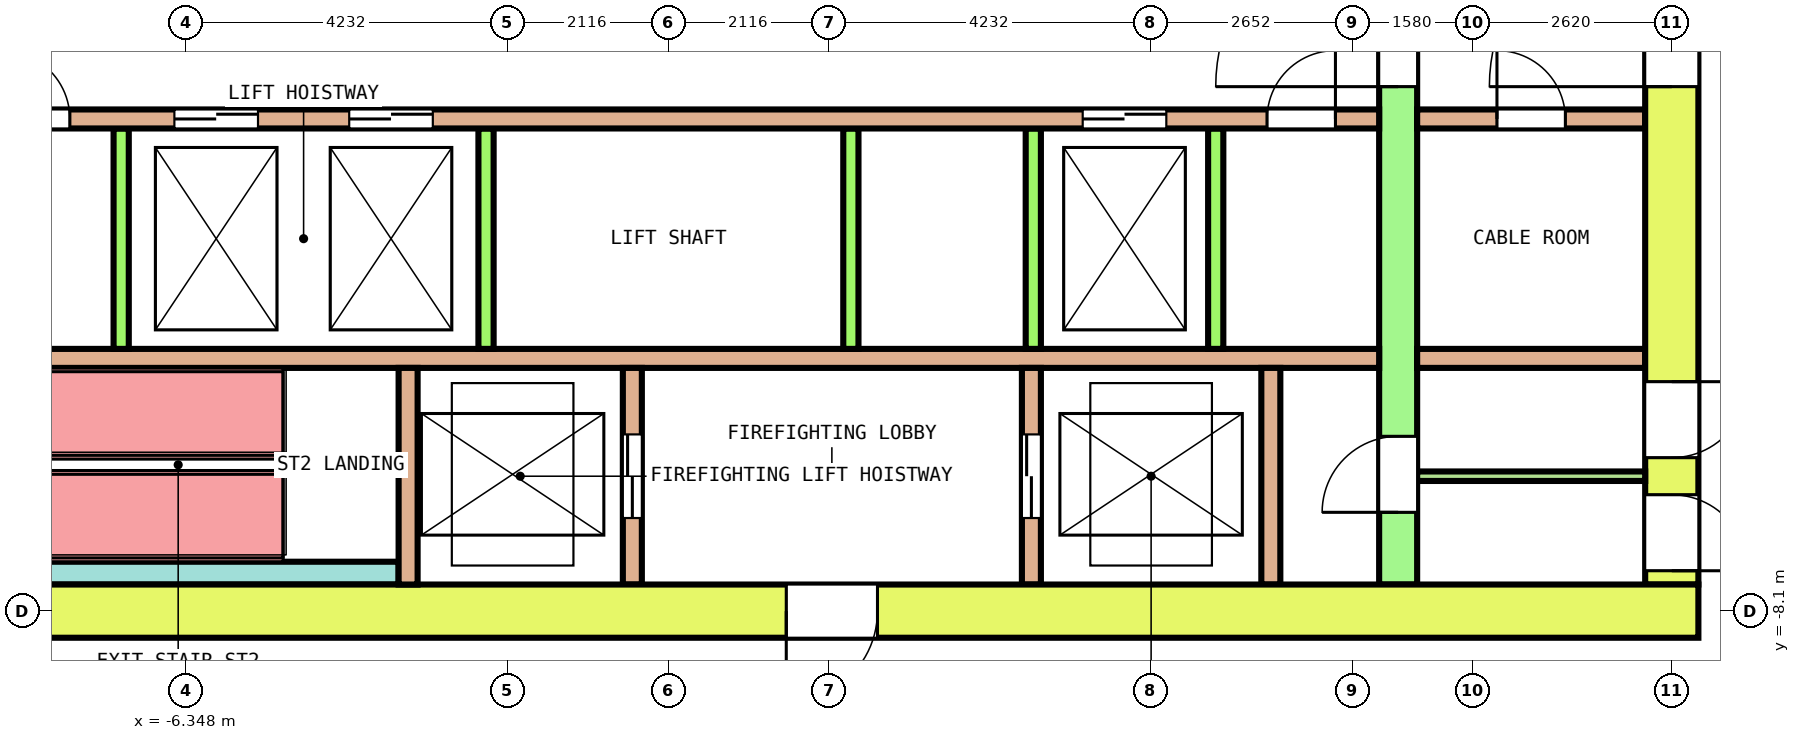
"""IFC4 building model, lengths in metres.
Left out: names, types, materials, properties, quantities, classifications, styles, units other than length and angle.
Written with IfcOpenShell. Run it as: python <this file> out.ifc"""

import sys

from ifc_helpers import new_model, si_unit, direction, frame, frame_2d, origin, place, context, subcontext, project, spatial, rectangle, extrude, element, fill, save


model = new_model("IFC4")
c1 = context("Model", 3, precision=1e-05, world=origin(), true_north=direction((0.0, 1.0)))
c2 = subcontext(c1, "Body", "Model", "MODEL_VIEW")
j1 = project(units=[si_unit("LENGTHUNIT", "METRE"), si_unit("PLANEANGLEUNIT", "RADIAN")], contexts=[c1])
p1 = place(None, origin())
s1 = spatial("IfcSite", under=j1, at=p1, CompositionType="ELEMENT")
p2 = place(p1, origin())
s2 = spatial("IfcBuilding", under=s1, at=p2, CompositionType="ELEMENT")
p3 = place(p2, frame((0.0, 0.0, 189.2)))
s3 = spatial("IfcBuildingStorey", under=s2, at=p3, CompositionType="ELEMENT", Elevation=189.2)
p4 = place(p3, frame((-13.55, -8.1, 0.0), z_axis=(0.0, 0.0, 1.0), x_axis=(1.0, 0.0, 0.0)))
e1 = element("IfcWall", 1, at=p4, inside=s3, PredefinedType="SHEAR", context=c2, shape_type="SweptSolid", body=[
    extrude(rectangle(XDim=27.1, YDim=0.7, at=frame_2d((13.55, 0.0))), origin(), (0.0, 0.0, 1.0), 4.1),
])
p5 = place(p4, frame((15.1, 0.0, 0.0)))
e2 = element("IfcOpeningElement", 2, at=p5, cuts=e1, PredefinedType="OPENING", context=c2, shape_type="SweptSolid", body=[
    extrude(rectangle(XDim=1.2, YDim=2.1, at=frame_2d((0.6, 1.05))), frame((0.0, 0.36, 0.0), z_axis=(0.0, -1.0, 0.0), x_axis=(1.0, 0.0, 0.0)), (0.0, 0.0, 1.0), 0.72),
])
p6 = place(p3, frame((13.2, -7.75, 0.0), z_axis=(0.0, 0.0, 1.0), x_axis=(0.0, 1.0, 0.0)))
e3 = element("IfcWall", 3, at=p6, inside=s3, PredefinedType="SHEAR", context=c2, shape_type="SweptSolid", body=[
    extrude(rectangle(XDim=15.5, YDim=0.7, at=frame_2d((7.75, 0.0))), origin(), (0.0, 0.0, 1.0), 4.1),
])
p7 = place(p6, frame((6.55, 0.0, 0.0)))
e4 = element("IfcOpeningElement", 4, at=p7, cuts=e3, PredefinedType="OPENING", context=c2, shape_type="SweptSolid", body=[
    extrude(rectangle(XDim=2.4, YDim=2.1, at=frame_2d((1.2, 1.05))), frame((0.0, 0.36, 0.0), z_axis=(0.0, -1.0, 0.0), x_axis=(1.0, 0.0, 0.0)), (0.0, 0.0, 1.0), 0.72),
])
p8 = place(p6, frame((13.45, 0.0, 0.0)))
e5 = element("IfcOpeningElement", 5, at=p8, cuts=e3, PredefinedType="OPENING", context=c2, shape_type="SweptSolid", body=[
    extrude(rectangle(XDim=1.2, YDim=2.1, at=frame_2d((0.6, 1.05))), frame((0.0, 0.36, 0.0), z_axis=(0.0, -1.0, 0.0), x_axis=(1.0, 0.0, 0.0)), (0.0, 0.0, 1.0), 0.72),
])
p9 = place(p6, frame((0.181, 0.0, 0.0)))
e6 = element("IfcOpeningElement", 6, at=p9, cuts=e3, PredefinedType="OPENING", context=c2, shape_type="SweptSolid", body=[
    extrude(rectangle(XDim=1.0, YDim=2.1, at=frame_2d((0.5, 1.05))), frame((0.0, 0.36, 0.0), z_axis=(0.0, -1.0, 0.0), x_axis=(1.0, 0.0, 0.0)), (0.0, 0.0, 1.0), 0.72),
])
p10 = place(p6, frame((1.669, 0.0, 0.0)))
e7 = element("IfcOpeningElement", 7, at=p10, cuts=e3, PredefinedType="OPENING", context=c2, shape_type="SweptSolid", body=[
    extrude(rectangle(XDim=1.0, YDim=2.1, at=frame_2d((0.5, 1.05))), frame((0.0, 0.36, 0.0), z_axis=(0.0, -1.0, 0.0), x_axis=(1.0, 0.0, 0.0)), (0.0, 0.0, 1.0), 0.72),
])
p11 = place(p3, frame((9.6, -7.75, 0.0), z_axis=(0.0, 0.0, 1.0), x_axis=(0.0, 1.0, 0.0)))
e8 = element("IfcWall", 8, at=p11, inside=s3, PredefinedType="SHEAR", context=c2, shape_type="SweptSolid", body=[
    extrude(rectangle(XDim=15.5, YDim=0.5, at=frame_2d((7.75, 0.0))), origin(), (0.0, 0.0, 1.0), 4.1),
])
p12 = place(p11, frame((6.55, 0.0, 0.0)))
e9 = element("IfcOpeningElement", 9, at=p12, cuts=e8, PredefinedType="OPENING", context=c2, shape_type="SweptSolid", body=[
    extrude(rectangle(XDim=2.4, YDim=2.1, at=frame_2d((1.2, 1.05))), frame((0.0, 0.26, 0.0), z_axis=(0.0, -1.0, 0.0), x_axis=(1.0, 0.0, 0.0)), (0.0, 0.0, 1.0), 0.52),
])
p13 = place(p11, frame((13.45, 0.0, 0.0)))
e10 = element("IfcOpeningElement", 10, at=p13, cuts=e8, PredefinedType="OPENING", context=c2, shape_type="SweptSolid", body=[
    extrude(rectangle(XDim=1.2, YDim=2.1, at=frame_2d((0.6, 1.05))), frame((0.0, 0.26, 0.0), z_axis=(0.0, -1.0, 0.0), x_axis=(1.0, 0.0, 0.0)), (0.0, 0.0, 1.0), 0.52),
])
p14 = place(p11, frame((0.95, 0.0, 0.0)))
e11 = element("IfcOpeningElement", 11, at=p14, cuts=e8, PredefinedType="OPENING", context=c2, shape_type="SweptSolid", body=[
    extrude(rectangle(XDim=1.0, YDim=2.1, at=frame_2d((0.5, 1.05))), frame((0.0, 0.26, 0.0), z_axis=(0.0, -1.0, 0.0), x_axis=(1.0, 0.0, 0.0)), (0.0, 0.0, 1.0), 0.52),
])
p15 = place(p3, frame((-9.35, -1.625, 0.0), z_axis=(0.0, 0.0, 1.0), x_axis=(1.0, 0.0, 0.0)))
e12 = element("IfcWall", 12, at=p15, inside=s3, PredefinedType="SOLIDWALL", context=c2, shape_type="SweptSolid", body=[
    extrude(rectangle(XDim=18.7, YDim=0.25, at=frame_2d((9.35, 0.0))), origin(), (0.0, 0.0, 1.0), 4.1),
])
p16 = place(p15, frame((2.85, 0.0, 0.0)))
e13 = element("IfcOpeningElement", 13, at=p16, cuts=e12, PredefinedType="OPENING", context=c2, shape_type="SweptSolid", body=[
    extrude(rectangle(XDim=1.1, YDim=2.1, at=frame_2d((0.55, 1.05))), frame((0.0, 0.135, 0.0), z_axis=(0.0, -1.0, 0.0), x_axis=(1.0, 0.0, 0.0)), (0.0, 0.0, 1.0), 0.27),
])
p17 = place(p15, frame((5.15, 0.0, 0.0)))
e14 = element("IfcOpeningElement", 14, at=p17, cuts=e12, PredefinedType="OPENING", context=c2, shape_type="SweptSolid", body=[
    extrude(rectangle(XDim=1.1, YDim=2.1, at=frame_2d((0.55, 1.05))), frame((0.0, 0.135, 0.0), z_axis=(0.0, -1.0, 0.0), x_axis=(1.0, 0.0, 0.0)), (0.0, 0.0, 1.0), 0.27),
])
p18 = place(p15, frame((14.8, 0.0, 0.0)))
e15 = element("IfcOpeningElement", 15, at=p18, cuts=e12, PredefinedType="OPENING", context=c2, shape_type="SweptSolid", body=[
    extrude(rectangle(XDim=1.1, YDim=2.1, at=frame_2d((0.55, 1.05))), frame((0.0, 0.135, 0.0), z_axis=(0.0, -1.0, 0.0), x_axis=(1.0, 0.0, 0.0)), (0.0, 0.0, 1.0), 0.27),
])
p19 = place(p15, frame((0.575, 0.0, 0.0)))
e16 = element("IfcOpeningElement", 16, at=p19, cuts=e12, PredefinedType="OPENING", context=c2, shape_type="SweptSolid", body=[
    extrude(rectangle(XDim=0.9, YDim=2.1, at=frame_2d((0.45, 1.05))), frame((0.0, 0.135, 0.0), z_axis=(0.0, -1.0, 0.0), x_axis=(1.0, 0.0, 0.0)), (0.0, 0.0, 1.0), 0.27),
])
p20 = place(p15, frame((17.225, 0.0, 0.0)))
e17 = element("IfcOpeningElement", 17, at=p20, cuts=e12, PredefinedType="OPENING", context=c2, shape_type="SweptSolid", body=[
    extrude(rectangle(XDim=0.9, YDim=2.1, at=frame_2d((0.45, 1.05))), frame((0.0, 0.135, 0.0), z_axis=(0.0, -1.0, 0.0), x_axis=(1.0, 0.0, 0.0)), (0.0, 0.0, 1.0), 0.27),
])
p21 = place(p3, frame((9.85, -1.625, 0.0), z_axis=(0.0, 0.0, 1.0), x_axis=(1.0, 0.0, 0.0)))
e18 = element("IfcWall", 18, at=p21, inside=s3, PredefinedType="SOLIDWALL", context=c2, shape_type="SweptSolid", body=[
    extrude(rectangle(XDim=3.0, YDim=0.25, at=frame_2d((1.5, 0.0))), origin(), (0.0, 0.0, 1.0), 4.1),
])
p22 = place(p21, frame((1.05, 0.0, 0.0)))
e19 = element("IfcOpeningElement", 19, at=p22, cuts=e18, PredefinedType="OPENING", context=c2, shape_type="SweptSolid", body=[
    extrude(rectangle(XDim=0.9, YDim=2.1, at=frame_2d((0.45, 1.05))), frame((0.0, 0.135, 0.0), z_axis=(0.0, -1.0, 0.0), x_axis=(1.0, 0.0, 0.0)), (0.0, 0.0, 1.0), 0.27),
])
p23 = place(p3, frame((-9.35, -4.775, 0.0), z_axis=(0.0, 0.0, 1.0), x_axis=(1.0, 0.0, 0.0)))
e20 = element("IfcWall", 20, at=p23, inside=s3, PredefinedType="SOLIDWALL", context=c2, shape_type="SweptSolid", body=[
    extrude(rectangle(XDim=18.7, YDim=0.25, at=frame_2d((9.35, 0.0))), origin(), (0.0, 0.0, 1.0), 4.1),
])
p24 = place(p3, frame((9.85, -4.775, 0.0), z_axis=(0.0, 0.0, 1.0), x_axis=(1.0, 0.0, 0.0)))
e21 = element("IfcWall", 21, at=p24, inside=s3, PredefinedType="SOLIDWALL", context=c2, shape_type="SweptSolid", body=[
    extrude(rectangle(XDim=3.0, YDim=0.25, at=frame_2d((1.5, 0.0))), origin(), (0.0, 0.0, 1.0), 4.1),
])
for number, where, z_axis, x_axis in (
    (22, (-7.2, -4.65, 0.0), (0.0, 0.0, 1.0), (0.0, 1.0, 0.0)),
    (23, (-2.4, -4.65, 0.0), (0.0, 0.0, 1.0), (0.0, 1.0, 0.0)),
    (24, (2.4, -4.65, 0.0), (0.0, 0.0, 1.0), (0.0, 1.0, 0.0)),
    (25, (4.8, -4.65, 0.0), (0.0, 0.0, 1.0), (0.0, 1.0, 0.0)),
    (26, (7.2, -4.65, 0.0), (0.0, 0.0, 1.0), (0.0, 1.0, 0.0)),
):
    element("IfcWall", number, at=place(p3, frame(where, z_axis=z_axis, x_axis=x_axis)), inside=s3, PredefinedType="SOLIDWALL", context=c2, shape_type="SweptSolid", body=[
        extrude(rectangle(XDim=2.9, YDim=0.2, at=frame_2d((1.45, 0.0))), origin(), (0.0, 0.0, 1.0), 4.1),
    ])
p25 = place(p3, frame((-9.35, -7.6, 0.0), z_axis=(0.0, 0.0, 1.0), x_axis=(1.0, 0.0, 0.0)))
e27 = element("IfcWall", 27, at=p25, inside=s3, PredefinedType="SOLIDWALL", context=c2, shape_type="SweptSolid", body=[
    extrude(rectangle(XDim=5.8, YDim=0.3, at=frame_2d((2.9, 0.0))), origin(), (0.0, 0.0, 1.0), 4.1),
])
p26 = place(p3, frame((-3.425, -7.75, 0.0), z_axis=(0.0, 0.0, 1.0), x_axis=(0.0, 1.0, 0.0)))
e28 = element("IfcWall", 28, at=p26, inside=s3, PredefinedType="SOLIDWALL", context=c2, shape_type="SweptSolid", body=[
    extrude(rectangle(XDim=2.85, YDim=0.25, at=frame_2d((1.425, 0.0))), origin(), (0.0, 0.0, 1.0), 4.1),
])
p27 = place(p3, frame((-0.475, -7.75, 0.0), z_axis=(0.0, 0.0, 1.0), x_axis=(0.0, 1.0, 0.0)))
e29 = element("IfcWall", 29, at=p27, inside=s3, PredefinedType="SOLIDWALL", context=c2, shape_type="SweptSolid", body=[
    extrude(rectangle(XDim=2.85, YDim=0.25, at=frame_2d((1.425, 0.0))), origin(), (0.0, 0.0, 1.0), 4.1),
])
p28 = place(p27, frame((0.875, 0.0, 0.0)))
e30 = element("IfcOpeningElement", 30, at=p28, cuts=e29, PredefinedType="OPENING", context=c2, shape_type="SweptSolid", body=[
    extrude(rectangle(XDim=1.1, YDim=2.1, at=frame_2d((0.55, 1.05))), frame((0.0, 0.135, 0.0), z_axis=(0.0, -1.0, 0.0), x_axis=(1.0, 0.0, 0.0)), (0.0, 0.0, 1.0), 0.27),
])
p29 = place(p3, frame((4.775, -7.75, 0.0), z_axis=(0.0, 0.0, 1.0), x_axis=(0.0, 1.0, 0.0)))
e31 = element("IfcWall", 31, at=p29, inside=s3, PredefinedType="SOLIDWALL", context=c2, shape_type="SweptSolid", body=[
    extrude(rectangle(XDim=2.85, YDim=0.25, at=frame_2d((1.425, 0.0))), origin(), (0.0, 0.0, 1.0), 4.1),
])
p30 = place(p29, frame((0.875, 0.0, 0.0)))
e32 = element("IfcOpeningElement", 32, at=p30, cuts=e31, PredefinedType="OPENING", context=c2, shape_type="SweptSolid", body=[
    extrude(rectangle(XDim=1.1, YDim=2.1, at=frame_2d((0.55, 1.05))), frame((0.0, 0.135, 0.0), z_axis=(0.0, -1.0, 0.0), x_axis=(1.0, 0.0, 0.0)), (0.0, 0.0, 1.0), 0.27),
])
p31 = place(p3, frame((7.925, -7.75, 0.0), z_axis=(0.0, 0.0, 1.0), x_axis=(0.0, 1.0, 0.0)))
e33 = element("IfcWall", 33, at=p31, inside=s3, PredefinedType="SOLIDWALL", context=c2, shape_type="SweptSolid", body=[
    extrude(rectangle(XDim=2.85, YDim=0.25, at=frame_2d((1.425, 0.0))), origin(), (0.0, 0.0, 1.0), 4.1),
])
p32 = place(p3, frame((9.85, -6.325, 0.0), z_axis=(0.0, 0.0, 1.0), x_axis=(1.0, 0.0, 0.0)))
e34 = element("IfcWall", 34, at=p32, inside=s3, PredefinedType="PARTITIONING", context=c2, shape_type="SweptSolid", body=[
    extrude(rectangle(XDim=3.0, YDim=0.125, at=frame_2d((1.5, 0.0))), origin(), (0.0, 0.0, 1.0), 4.1),
])
p33 = place(p16, origin())
e35 = element("IfcDoor", 35, at=p33, inside=s3, OperationType="DOUBLE_DOOR_SLIDING", PredefinedType="DOOR", context=c2, shape_type="SweptSolid", body=[
    extrude(rectangle(XDim=1.1, YDim=2.1, at=frame_2d((0.55, 1.05))), frame((0.0, 0.075, 0.0), z_axis=(0.0, -1.0, 0.0), x_axis=(1.0, 0.0, 0.0)), (0.0, 0.0, 1.0), 0.15),
])
fill(e13, e35)
p34 = place(p17, origin())
e36 = element("IfcDoor", 36, at=p34, inside=s3, OperationType="DOUBLE_DOOR_SLIDING", PredefinedType="DOOR", context=c2, shape_type="SweptSolid", body=[
    extrude(rectangle(XDim=1.1, YDim=2.1, at=frame_2d((0.55, 1.05))), frame((0.0, 0.075, 0.0), z_axis=(0.0, -1.0, 0.0), x_axis=(1.0, 0.0, 0.0)), (0.0, 0.0, 1.0), 0.15),
])
fill(e14, e36)
p35 = place(p18, origin())
e37 = element("IfcDoor", 37, at=p35, inside=s3, OperationType="DOUBLE_DOOR_SLIDING", PredefinedType="DOOR", context=c2, shape_type="SweptSolid", body=[
    extrude(rectangle(XDim=1.1, YDim=2.1, at=frame_2d((0.55, 1.05))), frame((0.0, 0.075, 0.0), z_axis=(0.0, -1.0, 0.0), x_axis=(1.0, 0.0, 0.0)), (0.0, 0.0, 1.0), 0.15),
])
fill(e15, e37)
p36 = place(p28, origin())
e38 = element("IfcDoor", 38, at=p36, inside=s3, OperationType="DOUBLE_DOOR_SLIDING", PredefinedType="DOOR", context=c2, shape_type="SweptSolid", body=[
    extrude(rectangle(XDim=1.1, YDim=2.1, at=frame_2d((0.55, 1.05))), frame((0.0, 0.075, 0.0), z_axis=(0.0, -1.0, 0.0), x_axis=(1.0, 0.0, 0.0)), (0.0, 0.0, 1.0), 0.15),
])
fill(e30, e38)
p37 = place(p30, origin())
e39 = element("IfcDoor", 39, at=p37, inside=s3, OperationType="DOUBLE_DOOR_SLIDING", PredefinedType="DOOR", context=c2, shape_type="SweptSolid", body=[
    extrude(rectangle(XDim=1.1, YDim=2.1, at=frame_2d((0.55, 1.05))), frame((0.0, 0.075, 0.0), z_axis=(0.0, -1.0, 0.0), x_axis=(1.0, 0.0, 0.0)), (0.0, 0.0, 1.0), 0.15),
])
fill(e32, e39)
p38 = place(p12, origin())
e40 = element("IfcDoor", 40, at=p38, inside=s3, OperationType="DOUBLE_DOOR_SINGLE_SWING", PredefinedType="DOOR", context=c2, shape_type="SweptSolid", body=[
    extrude(rectangle(XDim=2.4, YDim=2.1, at=frame_2d((1.2, 1.05))), frame((0.0, 0.2, 0.0), z_axis=(0.0, -1.0, 0.0), x_axis=(1.0, 0.0, 0.0)), (0.0, 0.0, 1.0), 0.4),
])
fill(e9, e40)
p39 = place(p7, origin())
e41 = element("IfcDoor", 41, at=p39, inside=s3, OperationType="DOUBLE_DOOR_SINGLE_SWING", PredefinedType="DOOR", context=c2, shape_type="SweptSolid", body=[
    extrude(rectangle(XDim=2.4, YDim=2.1, at=frame_2d((1.2, 1.05))), frame((0.0, 0.3, 0.0), z_axis=(0.0, -1.0, 0.0), x_axis=(1.0, 0.0, 0.0)), (0.0, 0.0, 1.0), 0.6),
])
fill(e4, e41)
p40 = place(p5, origin())
e42 = element("IfcDoor", 42, at=p40, inside=s3, OperationType="SINGLE_SWING_RIGHT", PredefinedType="DOOR", context=c2, shape_type="SweptSolid", body=[
    extrude(rectangle(XDim=1.2, YDim=2.1, at=frame_2d((0.6, 1.05))), frame((0.0, 0.3, 0.0), z_axis=(0.0, -1.0, 0.0), x_axis=(1.0, 0.0, 0.0)), (0.0, 0.0, 1.0), 0.6),
])
fill(e2, e42)
p41 = place(p14, origin())
e43 = element("IfcDoor", 43, at=p41, inside=s3, OperationType="SINGLE_SWING_RIGHT", PredefinedType="DOOR", context=c2, shape_type="SweptSolid", body=[
    extrude(rectangle(XDim=1.0, YDim=2.1, at=frame_2d((0.5, 1.05))), frame((0.0, 0.2, 0.0), z_axis=(0.0, -1.0, 0.0), x_axis=(1.0, 0.0, 0.0)), (0.0, 0.0, 1.0), 0.4),
])
fill(e11, e43)
p42 = place(p9, origin())
e44 = element("IfcDoor", 44, at=p42, inside=s3, OperationType="SINGLE_SWING_LEFT", PredefinedType="DOOR", context=c2, shape_type="SweptSolid", body=[
    extrude(rectangle(XDim=1.0, YDim=2.1, at=frame_2d((0.5, 1.05))), frame((0.0, 0.3, 0.0), z_axis=(0.0, -1.0, 0.0), x_axis=(1.0, 0.0, 0.0)), (0.0, 0.0, 1.0), 0.6),
])
fill(e6, e44)
p43 = place(p10, origin())
e45 = element("IfcDoor", 45, at=p43, inside=s3, OperationType="SINGLE_SWING_RIGHT", PredefinedType="DOOR", context=c2, shape_type="SweptSolid", body=[
    extrude(rectangle(XDim=1.0, YDim=2.1, at=frame_2d((0.5, 1.05))), frame((0.0, 0.3, 0.0), z_axis=(0.0, -1.0, 0.0), x_axis=(1.0, 0.0, 0.0)), (0.0, 0.0, 1.0), 0.6),
])
fill(e7, e45)
p44 = place(p19, origin())
e46 = element("IfcDoor", 46, at=p44, inside=s3, OperationType="SINGLE_SWING_RIGHT", PredefinedType="DOOR", context=c2, shape_type="SweptSolid", body=[
    extrude(rectangle(XDim=0.9, YDim=2.1, at=frame_2d((0.45, 1.05))), frame((0.0, 0.075, 0.0), z_axis=(0.0, -1.0, 0.0), x_axis=(1.0, 0.0, 0.0)), (0.0, 0.0, 1.0), 0.15),
])
fill(e16, e46)
p45 = place(p20, origin())
e47 = element("IfcDoor", 47, at=p45, inside=s3, OperationType="SINGLE_SWING_LEFT", PredefinedType="DOOR", context=c2, shape_type="SweptSolid", body=[
    extrude(rectangle(XDim=0.9, YDim=2.1, at=frame_2d((0.45, 1.05))), frame((0.0, 0.075, 0.0), z_axis=(0.0, -1.0, 0.0), x_axis=(1.0, 0.0, 0.0)), (0.0, 0.0, 1.0), 0.15),
])
fill(e17, e47)
p46 = place(p22, origin())
e48 = element("IfcDoor", 48, at=p46, inside=s3, OperationType="SINGLE_SWING_RIGHT", PredefinedType="DOOR", context=c2, shape_type="SweptSolid", body=[
    extrude(rectangle(XDim=0.9, YDim=2.1, at=frame_2d((0.45, 1.05))), frame((0.0, 0.075, 0.0), z_axis=(0.0, -1.0, 0.0), x_axis=(1.0, 0.0, 0.0)), (0.0, 0.0, 1.0), 0.15),
])
fill(e19, e48)
save(model, sys.argv[1])
